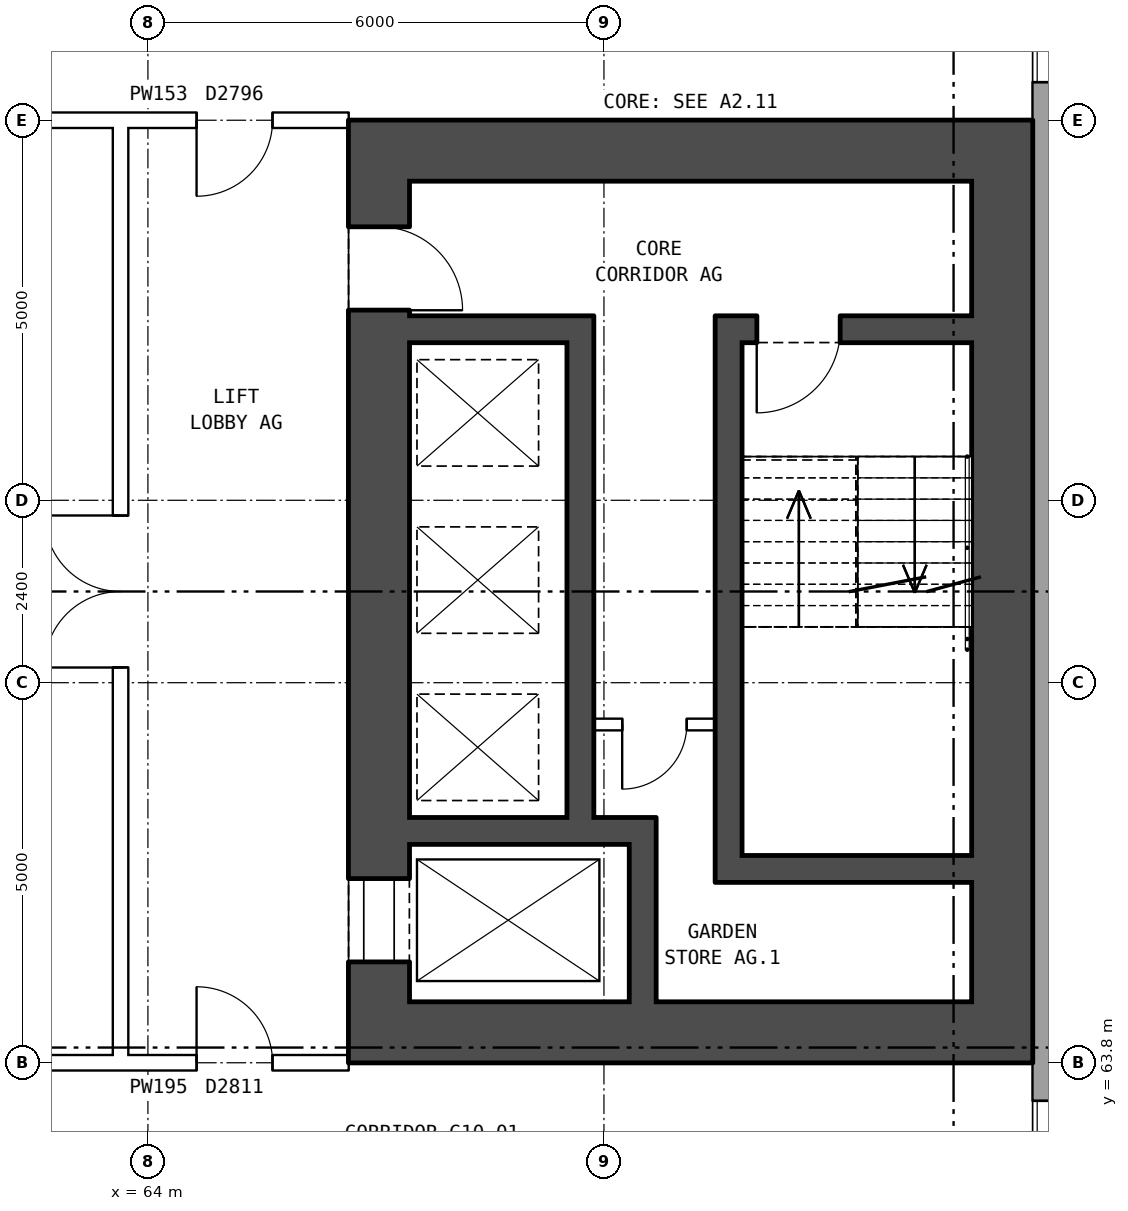
"""IFC4 building model, lengths in metres.
Left out: names, types, materials, properties, quantities, classifications, styles, units other than length and angle.
Written with IfcOpenShell. Run it as: python <this file> out.ifc"""

import sys

from ifc_helpers import new_model, si_unit, direction, frame, frame_2d, origin, place, context, subcontext, project, spatial, rectangle, extrude, element, fill, save


model = new_model("IFC4")
c1 = context("Model", 3, precision=1e-05, world=origin(), true_north=direction((0.0, 1.0)))
c2 = subcontext(c1, "Body", "Model", "MODEL_VIEW")
j1 = project(units=[si_unit("LENGTHUNIT", "METRE"), si_unit("PLANEANGLEUNIT", "RADIAN")], contexts=[c1])
p1 = place(None, origin())
s1 = spatial("IfcSite", under=j1, at=p1, CompositionType="ELEMENT")
p2 = place(p1, origin())
s2 = spatial("IfcBuilding", under=s1, at=p2, CompositionType="ELEMENT")
p3 = place(p2, frame((0.0, 0.0, 38.1)))
s3 = spatial("IfcBuildingStorey", under=s2, at=p3, CompositionType="ELEMENT", Elevation=38.1)
p4 = place(p3, frame((75.82, 57.075, 0.0), z_axis=(0.0, 0.0, 1.0), x_axis=(0.0, 1.0, 0.0)))
e1 = element("IfcWall", 1, at=p4, inside=s3, PredefinedType="STANDARD", context=c2, shape_type="SweptSolid", body=[
    extrude(rectangle(XDim=25.851, YDim=0.36, at=frame_2d((12.925, 0.0))), origin(), (0.0, 0.0, 1.0), 5.6),
])
p5 = place(p4, frame((1.625, 0.0, 0.15)))
e2 = element("IfcOpeningElement", 2, at=p5, cuts=e1, PredefinedType="OPENING", context=c2, shape_type="SweptSolid", body=[
    extrude(rectangle(XDim=1.6, YDim=2.4, at=frame_2d((0.8, 1.2))), frame((0.0, 0.19, 0.0), z_axis=(0.0, -1.0, 0.0), x_axis=(1.0, 0.0, 0.0)), (0.0, 0.0, 1.0), 0.38),
])
p6 = place(p4, frame((4.625, 0.0, 0.15)))
e3 = element("IfcOpeningElement", 3, at=p6, cuts=e1, PredefinedType="OPENING", context=c2, shape_type="SweptSolid", body=[
    extrude(rectangle(XDim=1.6, YDim=2.4, at=frame_2d((0.8, 1.2))), frame((0.0, 0.19, 0.0), z_axis=(0.0, -1.0, 0.0), x_axis=(1.0, 0.0, 0.0)), (0.0, 0.0, 1.0), 0.38),
])
p7 = place(p4, frame((19.625, 0.0, 0.15)))
e4 = element("IfcOpeningElement", 4, at=p7, cuts=e1, PredefinedType="OPENING", context=c2, shape_type="SweptSolid", body=[
    extrude(rectangle(XDim=1.6, YDim=2.4, at=frame_2d((0.8, 1.2))), frame((0.0, 0.19, 0.0), z_axis=(0.0, -1.0, 0.0), x_axis=(1.0, 0.0, 0.0)), (0.0, 0.0, 1.0), 0.38),
])
p8 = place(p4, frame((22.625, 0.0, 0.15)))
e5 = element("IfcOpeningElement", 5, at=p8, cuts=e1, PredefinedType="OPENING", context=c2, shape_type="SweptSolid", body=[
    extrude(rectangle(XDim=1.6, YDim=2.4, at=frame_2d((0.8, 1.2))), frame((0.0, 0.19, 0.0), z_axis=(0.0, -1.0, 0.0), x_axis=(1.0, 0.0, 0.0)), (0.0, 0.0, 1.0), 0.38),
])
p9 = place(p3, frame((67.04, 64.6, 0.0), z_axis=(0.0, 0.0, 1.0), x_axis=(0.0, 1.0, 0.0)))
e6 = element("IfcWall", 6, at=p9, inside=s3, PredefinedType="SHEAR", context=c2, shape_type="SweptSolid", body=[
    extrude(rectangle(XDim=10.8, YDim=0.8, at=frame_2d((5.4, 0.0))), origin(), (0.0, 0.0, 1.0), 5.6),
])
p10 = place(p9, frame((0.525, 0.0, 0.0)))
e7 = element("IfcOpeningElement", 7, at=p10, cuts=e6, PredefinedType="OPENING", context=c2, shape_type="SweptSolid", body=[
    extrude(rectangle(XDim=1.1, YDim=2.1, at=frame_2d((0.55, 1.05))), frame((0.0, 0.41, 0.0), z_axis=(0.0, -1.0, 0.0), x_axis=(1.0, 0.0, 0.0)), (0.0, 0.0, 1.0), 0.82),
])
p11 = place(p9, frame((9.1, 0.0, 0.0)))
e8 = element("IfcOpeningElement", 8, at=p11, cuts=e6, PredefinedType="OPENING", context=c2, shape_type="SweptSolid", body=[
    extrude(rectangle(XDim=1.1, YDim=2.1, at=frame_2d((0.55, 1.05))), frame((0.0, 0.41, 0.0), z_axis=(0.0, -1.0, 0.0), x_axis=(1.0, 0.0, 0.0)), (0.0, 0.0, 1.0), 0.82),
])
p12 = place(p3, frame((75.24, 64.6, 0.0), z_axis=(0.0, 0.0, 1.0), x_axis=(0.0, 1.0, 0.0)))
e9 = element("IfcWall", 9, at=p12, inside=s3, PredefinedType="SHEAR", context=c2, shape_type="SweptSolid", body=[
    extrude(rectangle(XDim=10.8, YDim=0.8, at=frame_2d((5.4, 0.0))), origin(), (0.0, 0.0, 1.0), 5.6),
])
for number, where, z_axis, x_axis in (
    (10, (66.64, 64.2, 0.0), (0.0, 0.0, 1.0), (1.0, 0.0, 0.0)),
    (11, (66.64, 75.8, 0.0), (0.0, 0.0, 1.0), (1.0, 0.0, 0.0)),
):
    element("IfcWall", number, at=place(p3, frame(where, z_axis=z_axis, x_axis=x_axis)), inside=s3, PredefinedType="SHEAR", context=c2, shape_type="SweptSolid", body=[
        extrude(rectangle(XDim=9.0, YDim=0.8, at=frame_2d((4.5, 0.0))), origin(), (0.0, 0.0, 1.0), 5.6),
    ])
p13 = place(p3, frame((71.815, 66.35, 0.0), z_axis=(0.0, 0.0, 1.0), x_axis=(1.0, 0.0, 0.0)))
e12 = element("IfcWall", 12, at=p13, inside=s3, PredefinedType="SHEAR", context=c2, shape_type="SweptSolid", body=[
    extrude(rectangle(XDim=3.025, YDim=0.35, at=frame_2d((1.513, 0.0))), origin(), (0.0, 0.0, 1.0), 5.6),
])
p14 = place(p3, frame((67.44, 66.85, 0.0), z_axis=(0.0, 0.0, 1.0), x_axis=(1.0, 0.0, 0.0)))
e13 = element("IfcWall", 13, at=p14, inside=s3, PredefinedType="SHEAR", context=c2, shape_type="SweptSolid", body=[
    extrude(rectangle(XDim=3.245, YDim=0.35, at=frame_2d((1.623, 0.0))), origin(), (0.0, 0.0, 1.0), 5.6),
])
p15 = place(p3, frame((69.865, 68.25, 0.0), z_axis=(0.0, 0.0, 1.0), x_axis=(1.0, 0.0, 0.0)))
e14 = element("IfcWall", 14, at=p15, inside=s3, PredefinedType="PARTITIONING", context=c2, shape_type="SweptSolid", body=[
    extrude(rectangle(XDim=1.6, YDim=0.15, at=frame_2d((0.8, 0.0))), origin(), (0.0, 0.0, 1.0), 5.6),
])
p16 = place(p15, frame((0.375, 0.0, 0.0)))
e15 = element("IfcOpeningElement", 15, at=p16, cuts=e14, PredefinedType="OPENING", context=c2, shape_type="SweptSolid", body=[
    extrude(rectangle(XDim=0.85, YDim=2.1, at=frame_2d((0.425, 1.05))), frame((0.0, 0.085, 0.0), z_axis=(0.0, -1.0, 0.0), x_axis=(1.0, 0.0, 0.0)), (0.0, 0.0, 1.0), 0.17),
])
p17 = place(p3, frame((67.44, 73.45, 0.0), z_axis=(0.0, 0.0, 1.0), x_axis=(1.0, 0.0, 0.0)))
e16 = element("IfcWall", 16, at=p17, inside=s3, PredefinedType="SHEAR", context=c2, shape_type="SweptSolid", body=[
    extrude(rectangle(XDim=2.075, YDim=0.35, at=frame_2d((1.038, 0.0))), origin(), (0.0, 0.0, 1.0), 5.6),
])
p18 = place(p3, frame((71.815, 73.45, 0.0), z_axis=(0.0, 0.0, 1.0), x_axis=(1.0, 0.0, 0.0)))
e17 = element("IfcWall", 17, at=p18, inside=s3, PredefinedType="SHEAR", context=c2, shape_type="SweptSolid", body=[
    extrude(rectangle(XDim=3.025, YDim=0.35, at=frame_2d((1.513, 0.0))), origin(), (0.0, 0.0, 1.0), 5.6),
])
p19 = place(p18, frame((0.195, 0.0, 0.0)))
e18 = element("IfcOpeningElement", 18, at=p19, cuts=e17, PredefinedType="OPENING", context=c2, shape_type="SweptSolid", body=[
    extrude(rectangle(XDim=1.1, YDim=2.1, at=frame_2d((0.55, 1.05))), frame((0.0, 0.185, 0.0), z_axis=(0.0, -1.0, 0.0), x_axis=(1.0, 0.0, 0.0)), (0.0, 0.0, 1.0), 0.37),
])
p20 = place(p3, frame((69.69, 67.025, 0.0), z_axis=(0.0, 0.0, 1.0), x_axis=(0.0, 1.0, 0.0)))
e19 = element("IfcWall", 19, at=p20, inside=s3, PredefinedType="SHEAR", context=c2, shape_type="SweptSolid", body=[
    extrude(rectangle(XDim=6.6, YDim=0.35, at=frame_2d((3.3, 0.0))), origin(), (0.0, 0.0, 1.0), 5.6),
])
p21 = place(p3, frame((70.51, 64.6, 0.0), z_axis=(0.0, 0.0, 1.0), x_axis=(0.0, 1.0, 0.0)))
e20 = element("IfcWall", 20, at=p21, inside=s3, PredefinedType="SHEAR", context=c2, shape_type="SweptSolid", body=[
    extrude(rectangle(XDim=2.075, YDim=0.35, at=frame_2d((1.038, 0.0))), origin(), (0.0, 0.0, 1.0), 5.6),
])
p22 = place(p3, frame((71.64, 66.175, 0.0), z_axis=(0.0, 0.0, 1.0), x_axis=(0.0, 1.0, 0.0)))
e21 = element("IfcWall", 21, at=p22, inside=s3, PredefinedType="SHEAR", context=c2, shape_type="SweptSolid", body=[
    extrude(rectangle(XDim=7.45, YDim=0.35, at=frame_2d((3.725, 0.0))), origin(), (0.0, 0.0, 1.0), 5.6),
])
p23 = place(p3, frame((63.64, 63.9, 0.0), z_axis=(0.0, 0.0, 1.0), x_axis=(0.0, 1.0, 0.0)))
e22 = element("IfcWall", 22, at=p23, inside=s3, PredefinedType="PARTITIONING", context=c2, shape_type="SweptSolid", body=[
    extrude(rectangle(XDim=12.2, YDim=0.2, at=frame_2d((6.1, 0.0))), origin(), (0.0, 0.0, 1.0), 5.6),
])
p24 = place(p23, frame((5.1, 0.0, 0.0)))
e23 = element("IfcOpeningElement", 23, at=p24, cuts=e22, PredefinedType="OPENING", context=c2, shape_type="SweptSolid", body=[
    extrude(rectangle(XDim=2.0, YDim=2.1, at=frame_2d((1.0, 1.05))), frame((0.0, 0.11, 0.0), z_axis=(0.0, -1.0, 0.0), x_axis=(1.0, 0.0, 0.0)), (0.0, 0.0, 1.0), 0.22),
])
p25 = place(p3, frame((44.36, 63.8, 0.0), z_axis=(0.0, 0.0, 1.0), x_axis=(1.0, 0.0, 0.0)))
e24 = element("IfcWall", 24, at=p25, inside=s3, PredefinedType="PARTITIONING", context=c2, shape_type="SweptSolid", body=[
    extrude(rectangle(XDim=19.28, YDim=0.2, at=frame_2d((9.64, 0.0))), origin(), (0.0, 0.0, 1.0), 5.6),
])
p26 = place(p25, frame((8.74, 0.0, 0.0)))
e25 = element("IfcOpeningElement", 25, at=p26, cuts=e24, PredefinedType="OPENING", context=c2, shape_type="SweptSolid", body=[
    extrude(rectangle(XDim=1.8, YDim=2.1, at=frame_2d((0.9, 1.05))), frame((0.0, 0.11, 0.0), z_axis=(0.0, -1.0, 0.0), x_axis=(1.0, 0.0, 0.0)), (0.0, 0.0, 1.0), 0.22),
])
p27 = place(p3, frame((63.64, 63.8, 0.0), z_axis=(0.0, 0.0, 1.0), x_axis=(1.0, 0.0, 0.0)))
e26 = element("IfcWall", 26, at=p27, inside=s3, PredefinedType="PARTITIONING", context=c2, shape_type="SweptSolid", body=[
    extrude(rectangle(XDim=3.0, YDim=0.2, at=frame_2d((1.5, 0.0))), origin(), (0.0, 0.0, 1.0), 5.6),
])
p28 = place(p27, frame((1.0, 0.0, 0.0)))
e27 = element("IfcOpeningElement", 27, at=p28, cuts=e26, PredefinedType="OPENING", context=c2, shape_type="SweptSolid", body=[
    extrude(rectangle(XDim=1.0, YDim=2.1, at=frame_2d((0.5, 1.05))), frame((0.0, 0.11, 0.0), z_axis=(0.0, -1.0, 0.0), x_axis=(1.0, 0.0, 0.0)), (0.0, 0.0, 1.0), 0.22),
])
p29 = place(p3, frame((44.36, 76.2, 0.0), z_axis=(0.0, 0.0, 1.0), x_axis=(1.0, 0.0, 0.0)))
e28 = element("IfcWall", 28, at=p29, inside=s3, PredefinedType="PARTITIONING", context=c2, shape_type="SweptSolid", body=[
    extrude(rectangle(XDim=19.28, YDim=0.2, at=frame_2d((9.64, 0.0))), origin(), (0.0, 0.0, 1.0), 5.6),
])
p30 = place(p29, frame((8.74, 0.0, 0.0)))
e29 = element("IfcOpeningElement", 29, at=p30, cuts=e28, PredefinedType="OPENING", context=c2, shape_type="SweptSolid", body=[
    extrude(rectangle(XDim=1.8, YDim=2.1, at=frame_2d((0.9, 1.05))), frame((0.0, 0.11, 0.0), z_axis=(0.0, -1.0, 0.0), x_axis=(1.0, 0.0, 0.0)), (0.0, 0.0, 1.0), 0.22),
])
p31 = place(p3, frame((63.64, 76.2, 0.0), z_axis=(0.0, 0.0, 1.0), x_axis=(1.0, 0.0, 0.0)))
e30 = element("IfcWall", 30, at=p31, inside=s3, PredefinedType="PARTITIONING", context=c2, shape_type="SweptSolid", body=[
    extrude(rectangle(XDim=3.0, YDim=0.2, at=frame_2d((1.5, 0.0))), origin(), (0.0, 0.0, 1.0), 5.6),
])
p32 = place(p31, frame((1.0, 0.0, 0.0)))
e31 = element("IfcOpeningElement", 31, at=p32, cuts=e30, PredefinedType="OPENING", context=c2, shape_type="SweptSolid", body=[
    extrude(rectangle(XDim=1.0, YDim=2.1, at=frame_2d((0.5, 1.05))), frame((0.0, 0.11, 0.0), z_axis=(0.0, -1.0, 0.0), x_axis=(1.0, 0.0, 0.0)), (0.0, 0.0, 1.0), 0.22),
])
p33 = place(p6, origin())
e32 = element("IfcWindow", 32, at=p33, inside=s3, PartitioningType="SINGLE_PANEL", PredefinedType="WINDOW", context=c2, shape_type="SweptSolid", body=[
    extrude(rectangle(XDim=1.6, YDim=2.4, at=frame_2d((0.8, 1.2))), frame((0.0, 0.15, 0.0), z_axis=(0.0, -1.0, 0.0), x_axis=(1.0, 0.0, 0.0)), (0.0, 0.0, 1.0), 0.06),
])
fill(e3, e32)
p34 = place(p7, origin())
e33 = element("IfcWindow", 33, at=p34, inside=s3, PartitioningType="SINGLE_PANEL", PredefinedType="WINDOW", context=c2, shape_type="SweptSolid", body=[
    extrude(rectangle(XDim=1.6, YDim=2.4, at=frame_2d((0.8, 1.2))), frame((0.0, 0.15, 0.0), z_axis=(0.0, -1.0, 0.0), x_axis=(1.0, 0.0, 0.0)), (0.0, 0.0, 1.0), 0.06),
])
fill(e4, e33)
p35 = place(p10, origin())
e34 = element("IfcDoor", 34, at=p35, inside=s3, OperationType="DOUBLE_DOOR_SLIDING", PredefinedType="DOOR", context=c2, shape_type="SweptSolid", body=[
    extrude(rectangle(XDim=1.1, YDim=2.1, at=frame_2d((0.55, 1.05))), frame((0.0, -0.335, 0.0), z_axis=(0.0, -1.0, 0.0), x_axis=(1.0, 0.0, 0.0)), (0.0, 0.0, 1.0), 0.05),
])
fill(e7, e34)
p36 = place(p11, frame((1.1, 0.0, 0.0), z_axis=(0.0, 0.0, 1.0), x_axis=(-1.0, 0.0, 0.0)))
e35 = element("IfcDoor", 35, at=p36, inside=s3, OperationType="SINGLE_SWING_RIGHT", PredefinedType="DOOR", context=c2, shape_type="SweptSolid", body=[
    extrude(rectangle(XDim=1.1, YDim=2.1, at=frame_2d((0.55, 1.05))), frame((0.0, 0.385, 0.0), z_axis=(0.0, -1.0, 0.0), x_axis=(1.0, 0.0, 0.0)), (0.0, 0.0, 1.0), 0.05),
])
fill(e8, e35)
p37 = place(p19, frame((1.1, 0.0, 0.0), z_axis=(0.0, 0.0, 1.0), x_axis=(-1.0, 0.0, 0.0)))
e36 = element("IfcDoor", 36, at=p37, inside=s3, OperationType="SINGLE_SWING_RIGHT", PredefinedType="DOOR", context=c2, shape_type="SweptSolid", body=[
    extrude(rectangle(XDim=1.1, YDim=2.1, at=frame_2d((0.55, 1.05))), frame((0.0, 0.025, 0.0), z_axis=(0.0, -1.0, 0.0), x_axis=(1.0, 0.0, 0.0)), (0.0, 0.0, 1.0), 0.05),
])
fill(e18, e36)
p38 = place(p16, frame((0.85, 0.0, 0.0), z_axis=(0.0, 0.0, 1.0), x_axis=(-1.0, 0.0, 0.0)))
e37 = element("IfcDoor", 37, at=p38, inside=s3, OperationType="SINGLE_SWING_RIGHT", PredefinedType="DOOR", context=c2, shape_type="SweptSolid", body=[
    extrude(rectangle(XDim=0.85, YDim=2.1, at=frame_2d((0.425, 1.05))), frame((0.0, 0.025, 0.0), z_axis=(0.0, -1.0, 0.0), x_axis=(1.0, 0.0, 0.0)), (0.0, 0.0, 1.0), 0.05),
])
fill(e15, e37)
p39 = place(p24, origin())
e38 = element("IfcDoor", 38, at=p39, inside=s3, OperationType="DOUBLE_DOOR_SINGLE_SWING", PredefinedType="DOOR", context=c2, shape_type="SweptSolid", body=[
    extrude(rectangle(XDim=2.0, YDim=2.1, at=frame_2d((1.0, 1.05))), frame((0.0, 0.025, 0.0), z_axis=(0.0, -1.0, 0.0), x_axis=(1.0, 0.0, 0.0)), (0.0, 0.0, 1.0), 0.05),
])
fill(e23, e38)
p40 = place(p28, origin())
e39 = element("IfcDoor", 39, at=p40, inside=s3, OperationType="SINGLE_SWING_LEFT", PredefinedType="DOOR", context=c2, shape_type="SweptSolid", body=[
    extrude(rectangle(XDim=1.0, YDim=2.1, at=frame_2d((0.5, 1.05))), frame((0.0, 0.025, 0.0), z_axis=(0.0, -1.0, 0.0), x_axis=(1.0, 0.0, 0.0)), (0.0, 0.0, 1.0), 0.05),
])
fill(e27, e39)
p41 = place(p32, frame((1.0, 0.0, 0.0), z_axis=(0.0, 0.0, 1.0), x_axis=(-1.0, 0.0, 0.0)))
e40 = element("IfcDoor", 40, at=p41, inside=s3, OperationType="SINGLE_SWING_RIGHT", PredefinedType="DOOR", context=c2, shape_type="SweptSolid", body=[
    extrude(rectangle(XDim=1.0, YDim=2.1, at=frame_2d((0.5, 1.05))), frame((0.0, 0.025, 0.0), z_axis=(0.0, -1.0, 0.0), x_axis=(1.0, 0.0, 0.0)), (0.0, 0.0, 1.0), 0.05),
])
fill(e31, e40)
save(model, sys.argv[1])
